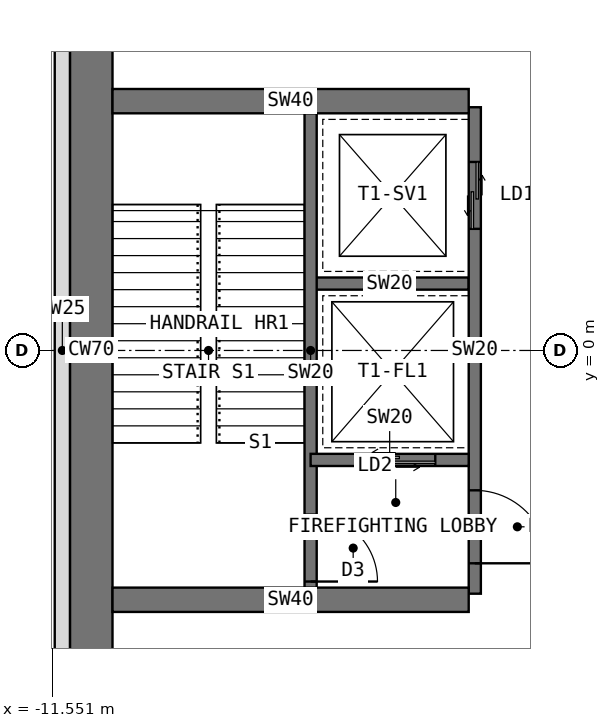
"""IFC4 building model, lengths in metres.
Left out: names, types, materials, properties, quantities, classifications, styles, units other than length and angle.
Written with IfcOpenShell. Run it as: python <this file> out.ifc"""

import sys

from ifc_helpers import new_model, si_unit, direction, frame, frame_2d, origin, place, context, subcontext, project, spatial, rectangle, extrude, element, fill, save


model = new_model("IFC4")
c1 = context("Model", 3, precision=1e-05, world=origin(), true_north=direction((0.0, 1.0)))
c2 = subcontext(c1, "Body", "Model", "MODEL_VIEW")
j1 = project(units=[si_unit("LENGTHUNIT", "METRE"), si_unit("PLANEANGLEUNIT", "RADIAN")], contexts=[c1])
p1 = place(None, origin())
s1 = spatial("IfcSite", under=j1, at=p1, CompositionType="ELEMENT")
p2 = place(p1, origin())
s2 = spatial("IfcBuilding", under=s1, at=p2, CompositionType="ELEMENT")
p3 = place(p2, origin())
s3 = spatial("IfcBuildingStorey", under=s2, at=p3, CompositionType="ELEMENT", Elevation=0.0)
p4 = place(p3, frame((-10.908, 6.298, 0.0), z_axis=(0.0, 0.0, 1.0), x_axis=(0.0, -1.0, 0.0)))
e1 = element("IfcWall", 1, at=p4, inside=s3, PredefinedType="SHEAR", context=c2, shape_type="SweptSolid", body=[
    extrude(rectangle(XDim=12.596, YDim=0.7, at=frame_2d((6.298, 0.0))), origin(), (0.0, 0.0, 1.0), 5.5),
])
p5 = place(p3, frame((-4.6, 4.0, 0.0), z_axis=(0.0, 0.0, 1.0), x_axis=(0.0, -1.0, 0.0)))
e2 = element("IfcWall", 2, at=p5, inside=s3, PredefinedType="SHEAR", context=c2, shape_type="SweptSolid", body=[
    extrude(rectangle(XDim=8.0, YDim=0.2, at=frame_2d((4.0, 0.0))), origin(), (0.0, 0.0, 1.0), 5.5),
])
p6 = place(p5, frame((6.3, 0.0, 0.0)))
e3 = element("IfcOpeningElement", 3, at=p6, cuts=e2, PredefinedType="OPENING", context=c2, shape_type="SweptSolid", body=[
    extrude(rectangle(XDim=1.2, YDim=2.1, at=frame_2d((0.6, 1.05))), frame((0.0, 0.11, 0.0), z_axis=(0.0, -1.0, 0.0), x_axis=(1.0, 0.0, 0.0)), (0.0, 0.0, 1.0), 0.22),
])
p7 = place(p5, frame((0.9, 0.0, 0.0)))
e4 = element("IfcOpeningElement", 4, at=p7, cuts=e2, PredefinedType="OPENING", context=c2, shape_type="SweptSolid", body=[
    extrude(rectangle(XDim=1.1, YDim=2.2, at=frame_2d((0.55, 1.1))), frame((0.0, 0.11, 0.0), z_axis=(0.0, -1.0, 0.0), x_axis=(1.0, 0.0, 0.0)), (0.0, 0.0, 1.0), 0.22),
])
p8 = place(p3, frame((-4.7, 1.1, 0.0), z_axis=(0.0, 0.0, 1.0), x_axis=(-1.0, 0.0, 0.0)))
e5 = element("IfcWall", 5, at=p8, inside=s3, PredefinedType="SHEAR", context=c2, shape_type="SweptSolid", body=[
    extrude(rectangle(XDim=2.6, YDim=0.2, at=frame_2d((1.3, 0.0))), origin(), (0.0, 0.0, 1.0), 5.5),
])
p9 = place(p3, frame((-4.7, -1.8, 0.0), z_axis=(0.0, 0.0, 1.0), x_axis=(-1.0, 0.0, 0.0)))
e6 = element("IfcWall", 6, at=p9, inside=s3, PredefinedType="SHEAR", context=c2, shape_type="SweptSolid", body=[
    extrude(rectangle(XDim=2.6, YDim=0.2, at=frame_2d((1.3, 0.0))), origin(), (0.0, 0.0, 1.0), 5.5),
])
p10 = place(p9, frame((0.55, 0.0, 0.0)))
e7 = element("IfcOpeningElement", 7, at=p10, cuts=e6, PredefinedType="OPENING", context=c2, shape_type="SweptSolid", body=[
    extrude(rectangle(XDim=1.3, YDim=2.2, at=frame_2d((0.65, 1.1))), frame((0.0, 0.11, 0.0), z_axis=(0.0, -1.0, 0.0), x_axis=(1.0, 0.0, 0.0)), (0.0, 0.0, 1.0), 0.22),
])
p11 = place(p3, frame((-7.3, 4.0, 0.0), z_axis=(0.0, 0.0, 1.0), x_axis=(0.0, -1.0, 0.0)))
e8 = element("IfcWall", 8, at=p11, inside=s3, PredefinedType="SHEAR", context=c2, shape_type="SweptSolid", body=[
    extrude(rectangle(XDim=8.0, YDim=0.2, at=frame_2d((4.0, 0.0))), origin(), (0.0, 0.0, 1.0), 5.5),
])
p12 = place(p11, frame((6.7, 0.0, 0.0)))
e9 = element("IfcOpeningElement", 9, at=p12, cuts=e8, PredefinedType="OPENING", context=c2, shape_type="SweptSolid", body=[
    extrude(rectangle(XDim=1.1, YDim=2.1, at=frame_2d((0.55, 1.05))), frame((0.0, 0.11, 0.0), z_axis=(0.0, -1.0, 0.0), x_axis=(1.0, 0.0, 0.0)), (0.0, 0.0, 1.0), 0.22),
])
for number, where, z_axis, x_axis in (
    (10, (-4.7, -4.1, 0.0), (0.0, 0.0, 1.0), (-1.0, 0.0, 0.0)),
    (11, (-4.7, 4.1, 0.0), (0.0, 0.0, 1.0), (-1.0, 0.0, 0.0)),
):
    element("IfcWall", number, at=place(p3, frame(where, z_axis=z_axis, x_axis=x_axis)), inside=s3, PredefinedType="SHEAR", context=c2, shape_type="SweptSolid", body=[
        extrude(rectangle(XDim=5.858, YDim=0.4, at=frame_2d((2.929, 0.0))), origin(), (0.0, 0.0, 1.0), 5.5),
    ])
p13 = place(p3, frame((-11.383, -5.967, 0.0), z_axis=(0.0, 0.0, 1.0), x_axis=(0.0, 1.0, 0.0)))
e12 = element("IfcWall", 12, at=p13, inside=s3, PredefinedType="STANDARD", context=c2, shape_type="SweptSolid", body=[
    extrude(rectangle(XDim=11.933, YDim=0.25, at=frame_2d((5.967, 0.0))), origin(), (0.0, 0.0, 1.0), 5.15),
])
p14 = place(p6, origin())
e13 = element("IfcDoor", 13, at=p14, inside=s3, OperationType="SINGLE_SWING_RIGHT", PredefinedType="DOOR", context=c2, shape_type="SweptSolid", body=[
    extrude(rectangle(XDim=1.2, YDim=2.1, at=frame_2d((0.6, 1.05))), frame((0.0, 0.025, 0.0), z_axis=(0.0, -1.0, 0.0), x_axis=(1.0, 0.0, 0.0)), (0.0, 0.0, 1.0), 0.05),
])
fill(e3, e13)
p15 = place(p10, origin())
e14 = element("IfcDoor", 14, at=p15, inside=s3, OperationType="DOUBLE_DOOR_SLIDING", PredefinedType="DOOR", context=c2, shape_type="SweptSolid", body=[
    extrude(rectangle(XDim=1.3, YDim=2.2, at=frame_2d((0.65, 1.1))), frame((0.0, 0.025, 0.0), z_axis=(0.0, -1.0, 0.0), x_axis=(1.0, 0.0, 0.0)), (0.0, 0.0, 1.0), 0.05),
])
fill(e7, e14)
p16 = place(p7, origin())
e15 = element("IfcDoor", 15, at=p16, inside=s3, OperationType="DOUBLE_DOOR_SLIDING", PredefinedType="DOOR", context=c2, shape_type="SweptSolid", body=[
    extrude(rectangle(XDim=1.1, YDim=2.2, at=frame_2d((0.55, 1.1))), frame((0.0, 0.025, 0.0), z_axis=(0.0, -1.0, 0.0), x_axis=(1.0, 0.0, 0.0)), (0.0, 0.0, 1.0), 0.05),
])
fill(e4, e15)
p17 = place(p12, origin())
e16 = element("IfcDoor", 16, at=p17, inside=s3, OperationType="SINGLE_SWING_RIGHT", PredefinedType="DOOR", context=c2, shape_type="SweptSolid", body=[
    extrude(rectangle(XDim=1.1, YDim=2.1, at=frame_2d((0.55, 1.05))), frame((0.0, 0.025, 0.0), z_axis=(0.0, -1.0, 0.0), x_axis=(1.0, 0.0, 0.0)), (0.0, 0.0, 1.0), 0.05),
])
fill(e9, e16)
save(model, sys.argv[1])
